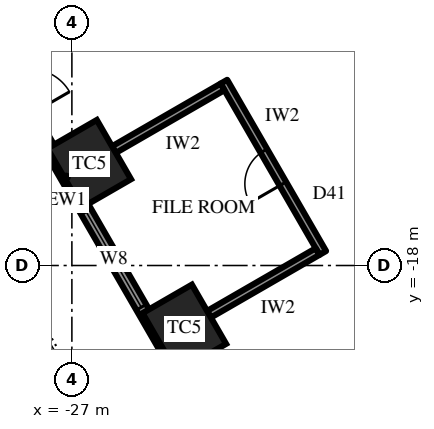
"""IFC4 building model, lengths in metres.
Left out: names, types, materials, properties, quantities, classifications, styles, units other than length and angle.
Written with IfcOpenShell. Run it as: python <this file> out.ifc"""

import sys

from ifc_helpers import new_model, si_unit, direction, frame, frame_2d, origin, origin_2d, place, context, subcontext, project, spatial, rectangle, extrude, element, fill, save


model = new_model("IFC4")
c1 = context("Model", 3, precision=1e-05, world=origin(), true_north=direction((0.0, 1.0)))
c2 = subcontext(c1, "Body", "Model", "MODEL_VIEW")
j1 = project(units=[si_unit("LENGTHUNIT", "METRE"), si_unit("PLANEANGLEUNIT", "RADIAN")], contexts=[c1])
p1 = place(None, origin())
s1 = spatial("IfcSite", under=j1, at=p1, CompositionType="ELEMENT")
p2 = place(p1, origin())
s2 = spatial("IfcBuilding", under=s1, at=p2, CompositionType="ELEMENT")
p3 = place(p2, frame((0.0, 0.0, 123.7)))
s3 = spatial("IfcBuildingStorey", under=s2, at=p3, CompositionType="ELEMENT", Elevation=123.7)
for number, where, z_axis, x_axis in (
    (1, (-26.544, -15.325, 0.0), (0.0, 0.0, 1.0), (0.5, -0.866, 0.0)),
    (2, (-24.042, -19.658, 0.0), (0.0, 0.0, 1.0), (0.5, -0.866, 0.0)),
):
    element("IfcColumn", number, at=place(p3, frame(where, z_axis=z_axis, x_axis=x_axis)), inside=s3, PredefinedType="COLUMN", context=c2, shape_type="SweptSolid", body=[
        extrude(rectangle(XDim=1.8, YDim=1.5, at=origin_2d()), origin(), (0.0, 0.0, 1.0), 4.2),
    ])
p4 = place(p3, frame((-34.656, -2.675, 0.0), z_axis=(0.0, 0.0, 1.0), x_axis=(0.500003084452, -0.866023622968, 0.0)))
e3 = element("IfcWall", 3, at=p4, inside=s3, PredefinedType="SOLIDWALL", context=c2, shape_type="SweptSolid", body=[
    extrude(rectangle(XDim=30.022, YDim=0.3, at=frame_2d((15.011, 0.0))), origin(), (0.0, 0.0, 1.0), 2.3),
])
p5 = place(p4, frame((1.052, 0.0, 0.6)))
e4 = element("IfcOpeningElement", 4, at=p5, cuts=e3, PredefinedType="OPENING", context=c2, shape_type="SweptSolid", body=[
    extrude(rectangle(XDim=2.9, YDim=1.45, at=frame_2d((1.45, 0.725))), frame((0.0, 0.16, 0.0), z_axis=(0.0, -1.0, 0.0), x_axis=(1.0, 0.0, 0.0)), (0.0, 0.0, 1.0), 0.32),
])
p6 = place(p4, frame((6.056, 0.0, 0.6)))
e5 = element("IfcOpeningElement", 5, at=p6, cuts=e3, PredefinedType="OPENING", context=c2, shape_type="SweptSolid", body=[
    extrude(rectangle(XDim=2.9, YDim=1.45, at=frame_2d((1.45, 0.725))), frame((0.0, 0.16, 0.0), z_axis=(0.0, -1.0, 0.0), x_axis=(1.0, 0.0, 0.0)), (0.0, 0.0, 1.0), 0.32),
])
p7 = place(p4, frame((11.909, 0.0, 0.0)))
e6 = element("IfcOpeningElement", 6, at=p7, cuts=e3, PredefinedType="OPENING", context=c2, shape_type="SweptSolid", body=[
    extrude(rectangle(XDim=1.2, YDim=2.2, at=frame_2d((0.6, 1.1))), frame((0.0, 0.16, 0.0), z_axis=(0.0, -1.0, 0.0), x_axis=(1.0, 0.0, 0.0)), (0.0, 0.0, 1.0), 0.32),
])
p8 = place(p4, frame((16.063, 0.0, 0.6)))
e7 = element("IfcOpeningElement", 7, at=p8, cuts=e3, PredefinedType="OPENING", context=c2, shape_type="SweptSolid", body=[
    extrude(rectangle(XDim=2.9, YDim=1.45, at=frame_2d((1.45, 0.725))), frame((0.0, 0.16, 0.0), z_axis=(0.0, -1.0, 0.0), x_axis=(1.0, 0.0, 0.0)), (0.0, 0.0, 1.0), 0.32),
])
p9 = place(p4, frame((21.067, 0.0, 0.6)))
e8 = element("IfcOpeningElement", 8, at=p9, cuts=e3, PredefinedType="OPENING", context=c2, shape_type="SweptSolid", body=[
    extrude(rectangle(XDim=2.9, YDim=1.45, at=frame_2d((1.45, 0.725))), frame((0.0, 0.16, 0.0), z_axis=(0.0, -1.0, 0.0), x_axis=(1.0, 0.0, 0.0)), (0.0, 0.0, 1.0), 0.32),
])
p10 = place(p4, frame((26.07, 0.0, 0.6)))
e9 = element("IfcOpeningElement", 9, at=p10, cuts=e3, PredefinedType="OPENING", context=c2, shape_type="SweptSolid", body=[
    extrude(rectangle(XDim=2.9, YDim=1.45, at=frame_2d((1.45, 0.725))), frame((0.0, 0.16, 0.0), z_axis=(0.0, -1.0, 0.0), x_axis=(1.0, 0.0, 0.0)), (0.0, 0.0, 1.0), 0.32),
])
p11 = place(p3, frame((-23.0, -13.163, 0.0), z_axis=(0.0, 0.0, 1.0), x_axis=(0.500024327116, -0.866011358062, 0.0)))
e10 = element("IfcWall", 10, at=p11, inside=s3, PredefinedType="PARTITIONING", context=c2, shape_type="SweptSolid", body=[
    extrude(rectangle(XDim=5.204, YDim=0.2, at=frame_2d((2.602, 0.0))), origin(), (0.0, 0.0, 1.0), 4.0),
])
p12 = place(p11, frame((2.102, 0.0, 0.0)))
e11 = element("IfcOpeningElement", 11, at=p12, cuts=e10, PredefinedType="OPENING", context=c2, shape_type="SweptSolid", body=[
    extrude(rectangle(XDim=1.0, YDim=2.2, at=frame_2d((0.5, 1.1))), frame((0.0, 0.11, 0.0), z_axis=(0.0, -1.0, 0.0), x_axis=(1.0, 0.0, 0.0)), (0.0, 0.0, 1.0), 0.22),
])
p13 = place(p3, frame((-23.036, -13.3, 0.0), z_axis=(0.0, 0.0, 1.0), x_axis=(-0.866021716278, -0.500006386895, 0.0)))
e12 = element("IfcWall", 12, at=p13, inside=s3, PredefinedType="PARTITIONING", context=c2, shape_type="SweptSolid", body=[
    extrude(rectangle(XDim=3.3, YDim=0.2, at=frame_2d((1.65, 0.0))), origin(), (0.0, 0.0, 1.0), 4.0),
])
p14 = place(p3, frame((-20.534, -17.633, 0.0), z_axis=(0.0, 0.0, 1.0), x_axis=(-0.866008176907, -0.50002983664, 0.0)))
e13 = element("IfcWall", 13, at=p14, inside=s3, PredefinedType="PARTITIONING", context=c2, shape_type="SweptSolid", body=[
    extrude(rectangle(XDim=3.3, YDim=0.2, at=frame_2d((1.65, 0.0))), origin(), (0.0, 0.0, 1.0), 3.082),
])
p15 = place(p8, origin())
e14 = element("IfcWindow", 14, at=p15, inside=s3, PartitioningType="SINGLE_PANEL", PredefinedType="WINDOW", context=c2, shape_type="SweptSolid", body=[
    extrude(rectangle(XDim=2.9, YDim=1.45, at=frame_2d((1.45, 0.725))), frame((0.0, 0.03, 0.0), z_axis=(0.0, -1.0, 0.0), x_axis=(1.0, 0.0, 0.0)), (0.0, 0.0, 1.0), 0.06),
])
fill(e7, e14)
p16 = place(p12, frame((1.0, 0.0, 0.0), z_axis=(0.0, 0.0, 1.0), x_axis=(-1.0, 0.0, 0.0)))
e15 = element("IfcDoor", 15, at=p16, inside=s3, OperationType="SINGLE_SWING_RIGHT", PredefinedType="DOOR", context=c2, shape_type="SweptSolid", body=[
    extrude(rectangle(XDim=1.0, YDim=2.2, at=frame_2d((0.5, 1.1))), frame((0.0, 0.025, 0.0), z_axis=(0.0, -1.0, 0.0), x_axis=(1.0, 0.0, 0.0)), (0.0, 0.0, 1.0), 0.05),
])
fill(e11, e15)
save(model, sys.argv[1])
